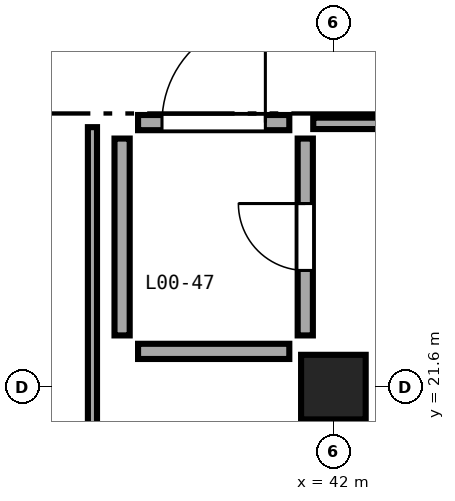
"""IFC4 building model, lengths in metres.
Left out: names, types, materials, properties, quantities, classifications, styles, units other than length and angle.
Written with IfcOpenShell. Run it as: python <this file> out.ifc"""

import sys

from ifc_helpers import new_model, si_unit, direction, frame, frame_2d, origin, origin_2d, place, context, subcontext, project, spatial, rectangle, extrude, element, fill, save


model = new_model("IFC4")
c1 = context("Model", 3, precision=1e-05, world=origin(), true_north=direction((0.0, 1.0)))
c2 = subcontext(c1, "Body", "Model", "MODEL_VIEW")
j1 = project(units=[si_unit("LENGTHUNIT", "METRE"), si_unit("PLANEANGLEUNIT", "RADIAN")], contexts=[c1])
p1 = place(None, origin())
s1 = spatial("IfcSite", under=j1, at=p1, CompositionType="ELEMENT")
p2 = place(p1, origin())
s2 = spatial("IfcBuilding", under=s1, at=p2, CompositionType="ELEMENT")
p3 = place(p2, origin())
s3 = spatial("IfcBuildingStorey", under=s2, at=p3, CompositionType="ELEMENT", Elevation=0.0)
p4 = place(p3, frame((42.0, 21.6, 0.0), z_axis=(0.0, 0.0, 1.0), x_axis=(1.0, 0.0, 0.0)))
e1 = element("IfcColumn", 1, at=p4, inside=s3, PredefinedType="COLUMN", context=c2, shape_type="SweptSolid", body=[
    extrude(rectangle(XDim=0.85, YDim=0.85, at=origin_2d()), origin(), (0.0, 0.0, 1.0), 5.4),
])
p5 = place(p3, frame((41.735, 25.07, 0.0), z_axis=(0.0, 0.0, 1.0), x_axis=(1.0, 0.0, 0.0)))
e2 = element("IfcWall", 2, at=p5, inside=s3, PredefinedType="PARTITIONING", context=c2, shape_type="SweptSolid", body=[
    extrude(rectangle(XDim=8.255, YDim=0.15, at=frame_2d((4.127, 0.0))), origin(), (0.0, 0.0, 1.0), 5.08),
])
p6 = place(p5, frame((3.688, 0.0, 0.0)))
e3 = element("IfcOpeningElement", 3, at=p6, cuts=e2, PredefinedType="OPENING", context=c2, shape_type="SweptSolid", body=[
    extrude(rectangle(XDim=0.88, YDim=2.45, at=frame_2d((0.44, 1.225))), frame((0.0, 0.095, 0.0), z_axis=(0.0, -1.0, 0.0), x_axis=(1.0, 0.0, 0.0)), (0.0, 0.0, 1.0), 0.19),
])
p7 = place(p3, frame((38.83, 21.03, 0.0), z_axis=(0.0, 0.0, 1.0), x_axis=(0.0, 1.0, 0.0)))
e4 = element("IfcWall", 4, at=p7, inside=s3, PredefinedType="PARTITIONING", context=c2, shape_type="SweptSolid", body=[
    extrude(rectangle(XDim=3.99, YDim=0.12, at=frame_2d((1.995, 0.0))), origin(), (0.0, 0.0, 1.0), 5.08),
])
p8 = place(p3, frame((41.63, 22.28, 0.0), z_axis=(0.0, 0.0, 1.0), x_axis=(0.0, 1.0, 0.0)))
e5 = element("IfcWall", 5, at=p8, inside=s3, PredefinedType="PLUMBINGWALL", context=c2, shape_type="SweptSolid", body=[
    extrude(rectangle(XDim=2.59, YDim=0.2, at=frame_2d((1.295, 0.0))), origin(), (0.0, 0.0, 1.0), 4.58),
])
p9 = place(p8, frame((0.855, 0.0, 0.0)))
e6 = element("IfcOpeningElement", 6, at=p9, cuts=e5, PredefinedType="OPENING", context=c2, shape_type="SweptSolid", body=[
    extrude(rectangle(XDim=0.88, YDim=2.13, at=frame_2d((0.44, 1.065))), frame((0.0, 0.12, 0.0), z_axis=(0.0, -1.0, 0.0), x_axis=(1.0, 0.0, 0.0)), (0.0, 0.0, 1.0), 0.24),
])
p10 = place(p3, frame((39.22, 22.28, 0.0), z_axis=(0.0, 0.0, 1.0), x_axis=(0.0, 1.0, 0.0)))
e7 = element("IfcWall", 7, at=p10, inside=s3, PredefinedType="PLUMBINGWALL", context=c2, shape_type="SweptSolid", body=[
    extrude(rectangle(XDim=2.59, YDim=0.2, at=frame_2d((1.295, 0.0))), origin(), (0.0, 0.0, 1.0), 5.08),
])
p11 = place(p3, frame((39.43, 25.08, 0.0), z_axis=(0.0, 0.0, 1.0), x_axis=(1.0, 0.0, 0.0)))
e8 = element("IfcWall", 8, at=p11, inside=s3, PredefinedType="PLUMBINGWALL", context=c2, shape_type="SweptSolid", body=[
    extrude(rectangle(XDim=1.99, YDim=0.2, at=frame_2d((0.995, 0.0))), origin(), (0.0, 0.0, 1.0), 5.08),
])
p12 = place(p11, frame((0.315, 0.0, 0.0)))
e9 = element("IfcOpeningElement", 9, at=p12, cuts=e8, PredefinedType="OPENING", context=c2, shape_type="SweptSolid", body=[
    extrude(rectangle(XDim=1.36, YDim=2.37, at=frame_2d((0.68, 1.185))), frame((0.0, 0.12, 0.0), z_axis=(0.0, -1.0, 0.0), x_axis=(1.0, 0.0, 0.0)), (0.0, 0.0, 1.0), 0.24),
])
p13 = place(p3, frame((39.43, 22.07, 0.0), z_axis=(0.0, 0.0, 1.0), x_axis=(1.0, 0.0, 0.0)))
e10 = element("IfcWall", 10, at=p13, inside=s3, PredefinedType="PLUMBINGWALL", context=c2, shape_type="SweptSolid", body=[
    extrude(rectangle(XDim=1.99, YDim=0.2, at=frame_2d((0.995, 0.0))), origin(), (0.0, 0.0, 1.0), 4.58),
])
p14 = place(p9, origin())
e11 = element("IfcDoor", 11, at=p14, inside=s3, OperationType="SINGLE_SWING_RIGHT", PredefinedType="DOOR", context=c2, shape_type="SweptSolid", body=[
    extrude(rectangle(XDim=0.88, YDim=2.13, at=frame_2d((0.44, 1.065))), frame((0.0, 0.025, 0.0), z_axis=(0.0, -1.0, 0.0), x_axis=(1.0, 0.0, 0.0)), (0.0, 0.0, 1.0), 0.05),
])
fill(e6, e11)
p15 = place(p12, frame((1.36, 0.0, 0.0), z_axis=(0.0, 0.0, 1.0), x_axis=(-1.0, 0.0, 0.0)))
e12 = element("IfcDoor", 12, at=p15, inside=s3, OperationType="SINGLE_SWING_RIGHT", PredefinedType="DOOR", context=c2, shape_type="SweptSolid", body=[
    extrude(rectangle(XDim=1.36, YDim=2.37, at=frame_2d((0.68, 1.185))), frame((0.0, 0.025, 0.0), z_axis=(0.0, -1.0, 0.0), x_axis=(1.0, 0.0, 0.0)), (0.0, 0.0, 1.0), 0.05),
])
fill(e9, e12)
save(model, sys.argv[1])
